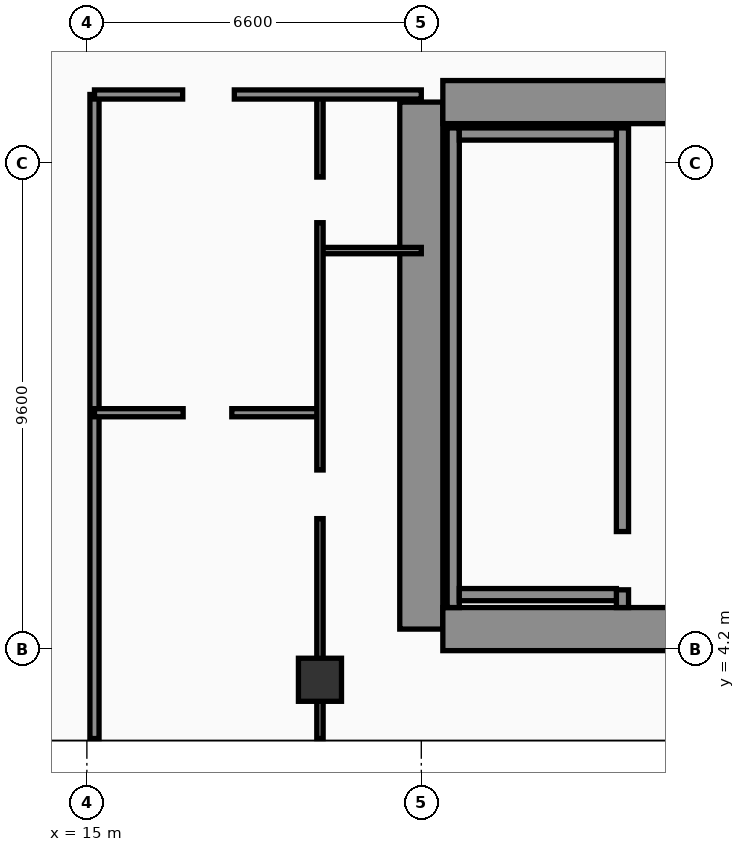
"""IFC4 building model, lengths in metres.
Left out: names, types, materials, properties, quantities, classifications, styles, units other than length and angle.
Written with IfcOpenShell. Run it as: python <this file> out.ifc"""

import sys

from ifc_helpers import new_model, si_unit, direction, frame, frame_2d, origin, origin_2d, place, context, subcontext, project, spatial, rectangle, hollow_rectangle, extrude, element, fill, save


model = new_model("IFC4")
c1 = context("Model", 3, precision=1e-05, world=origin(), true_north=direction((0.0, 1.0)))
c2 = subcontext(c1, "Body", "Model", "MODEL_VIEW")
j1 = project(units=[si_unit("LENGTHUNIT", "METRE"), si_unit("PLANEANGLEUNIT", "RADIAN")], contexts=[c1])
p1 = place(None, origin())
s1 = spatial("IfcSite", under=j1, at=p1, CompositionType="ELEMENT")
p2 = place(p1, origin())
s2 = spatial("IfcBuilding", under=s1, at=p2, CompositionType="ELEMENT")
p3 = place(p2, frame((0.0, 0.0, 171.3)))
s3 = spatial("IfcBuildingStorey", under=s2, at=p3, CompositionType="ELEMENT", Elevation=171.3)
p4 = place(p3, frame((21.6, 4.6, 0.0), z_axis=(0.0, 0.0, 1.0), x_axis=(0.0, 1.0, 0.0)))
e1 = element("IfcWall", 1, at=p4, inside=s3, PredefinedType="SHEAR", context=c2, shape_type="SweptSolid", body=[
    extrude(rectangle(XDim=10.4, YDim=0.85, at=frame_2d((5.2, 0.0))), origin(), (0.0, 0.0, 1.0), 3.56),
])
p5 = place(p3, frame((22.025, 15.0, 0.0), z_axis=(0.0, 0.0, 1.0), x_axis=(1.0, 0.0, 0.0)))
e2 = element("IfcWall", 2, at=p5, inside=s3, PredefinedType="SHEAR", context=c2, shape_type="SweptSolid", body=[
    extrude(rectangle(XDim=9.95, YDim=0.85, at=frame_2d((4.975, 0.0))), origin(), (0.0, 0.0, 1.0), 3.56),
])
p6 = place(p5, frame((4.88, 0.0, 0.0)))
e3 = element("IfcOpeningElement", 3, at=p6, cuts=e2, PredefinedType="OPENING", context=c2, shape_type="SweptSolid", body=[
    extrude(rectangle(XDim=1.1, YDim=2.2, at=frame_2d((0.55, 1.1))), frame((0.0, 0.435, 0.0), z_axis=(0.0, -1.0, 0.0), x_axis=(1.0, 0.0, 0.0)), (0.0, 0.0, 1.0), 0.87),
])
p7 = place(p3, frame((22.025, 4.6, 0.0), z_axis=(0.0, 0.0, 1.0), x_axis=(1.0, 0.0, 0.0)))
e4 = element("IfcWall", 4, at=p7, inside=s3, PredefinedType="SHEAR", context=c2, shape_type="SweptSolid", body=[
    extrude(rectangle(XDim=9.95, YDim=0.85, at=frame_2d((4.975, 0.0))), origin(), (0.0, 0.0, 1.0), 3.56),
])
p8 = place(p3, frame((22.23, 5.025, 0.0), z_axis=(0.0, 0.0, 1.0), x_axis=(0.0, 1.0, 0.0)))
e5 = element("IfcWall", 5, at=p8, inside=s3, PredefinedType="SOLIDWALL", context=c2, shape_type="SweptSolid", body=[
    extrude(rectangle(XDim=9.465, YDim=0.24, at=frame_2d((4.732, 0.0))), origin(), (0.0, 0.0, 1.0), 3.56),
])
p9 = place(p3, frame((25.57, 5.025, 0.0), z_axis=(0.0, 0.0, 1.0), x_axis=(0.0, 1.0, 0.0)))
e6 = element("IfcWall", 6, at=p9, inside=s3, PredefinedType="SOLIDWALL", context=c2, shape_type="SweptSolid", body=[
    extrude(rectangle(XDim=9.465, YDim=0.24, at=frame_2d((4.732, 0.0))), origin(), (0.0, 0.0, 1.0), 3.56),
])
p10 = place(p9, frame((0.35, 0.0, 0.0)))
e7 = element("IfcOpeningElement", 7, at=p10, cuts=e6, PredefinedType="OPENING", context=c2, shape_type="SweptSolid", body=[
    extrude(rectangle(XDim=1.15, YDim=2.2, at=frame_2d((0.575, 1.1))), frame((0.0, 0.13, 0.0), z_axis=(0.0, -1.0, 0.0), x_axis=(1.0, 0.0, 0.0)), (0.0, 0.0, 1.0), 0.26),
])
for number, where, z_axis, x_axis in (
    (8, (22.35, 5.28, 0.0), (0.0, 0.0, 1.0), (1.0, 0.0, 0.0)),
    (9, (22.35, 14.37, 0.0), (0.0, 0.0, 1.0), (1.0, 0.0, 0.0)),
):
    element("IfcWall", number, at=place(p3, frame(where, z_axis=z_axis, x_axis=x_axis)), inside=s3, PredefinedType="SOLIDWALL", context=c2, shape_type="SweptSolid", body=[
        extrude(rectangle(XDim=3.1, YDim=0.24, at=frame_2d((1.55, 0.0))), origin(), (0.0, 0.0, 1.0), 3.56),
    ])
p11 = place(p3, frame((19.6, 3.6, 0.0), z_axis=(0.0, 0.0, 1.0), x_axis=(1.0, 0.0, 0.0)))
e10 = element("IfcColumn", 10, at=p11, inside=s3, PredefinedType="COLUMN", context=c2, shape_type="SweptSolid", body=[
    extrude(hollow_rectangle(XDim=0.85, YDim=0.85, WallThickness=0.036, at=origin_2d()), origin(), (0.0, 0.0, 1.0), 3.56),
])
p12 = place(p3, frame((15.15, 2.44, 0.0), z_axis=(0.0, 0.0, 1.0), x_axis=(0.0, 1.0, 0.0)))
e11 = element("IfcWall", 11, at=p12, inside=s3, PredefinedType="PARTITIONING", context=c2, shape_type="SweptSolid", body=[
    extrude(rectangle(XDim=12.71, YDim=0.18, at=frame_2d((6.355, 0.0))), origin(), (0.0, 0.0, 1.0), 3.04),
])
p13 = place(p3, frame((19.6, 12.07, 0.0), z_axis=(0.0, 0.0, 1.0), x_axis=(1.0, 0.0, 0.0)))
e12 = element("IfcWall", 12, at=p13, inside=s3, PredefinedType="PARTITIONING", context=c2, shape_type="SweptSolid", body=[
    extrude(rectangle(XDim=2.0, YDim=0.125, at=frame_2d((1.0, 0.0))), origin(), (0.0, 0.0, 1.0), 3.56),
])
p14 = place(p3, frame((15.15, 8.87, 0.0), z_axis=(0.0, 0.0, 1.0), x_axis=(1.0, 0.0, 0.0)))
e13 = element("IfcWall", 13, at=p14, inside=s3, PredefinedType="PARTITIONING", context=c2, shape_type="SweptSolid", body=[
    extrude(rectangle(XDim=4.45, YDim=0.16, at=frame_2d((2.225, 0.0))), origin(), (0.0, 0.0, 1.0), 3.56),
])
p15 = place(p14, frame((1.75, 0.0, 0.0)))
e14 = element("IfcOpeningElement", 14, at=p15, cuts=e13, PredefinedType="OPENING", context=c2, shape_type="SweptSolid", body=[
    extrude(rectangle(XDim=0.96, YDim=2.2, at=frame_2d((0.48, 1.1))), frame((0.0, 0.09, 0.0), z_axis=(0.0, -1.0, 0.0), x_axis=(1.0, 0.0, 0.0)), (0.0, 0.0, 1.0), 0.18),
])
p16 = place(p3, frame((19.6, 2.44, 0.0), z_axis=(0.0, 0.0, 1.0), x_axis=(0.0, 1.0, 0.0)))
e15 = element("IfcWall", 15, at=p16, inside=s3, PredefinedType="PARTITIONING", context=c2, shape_type="SweptSolid", body=[
    extrude(rectangle(XDim=12.71, YDim=0.125, at=frame_2d((6.355, 0.0))), origin(), (0.0, 0.0, 1.0), 2.49),
])
p17 = place(p16, frame((4.34, 0.0, 0.0)))
e16 = element("IfcOpeningElement", 16, at=p17, cuts=e15, PredefinedType="OPENING", context=c2, shape_type="SweptSolid", body=[
    extrude(rectangle(XDim=0.96, YDim=2.2, at=frame_2d((0.48, 1.1))), frame((0.0, 0.073, 0.0), z_axis=(0.0, -1.0, 0.0), x_axis=(1.0, 0.0, 0.0)), (0.0, 0.0, 1.0), 0.145),
])
p18 = place(p16, frame((10.18, 0.0, 0.0)))
e17 = element("IfcOpeningElement", 17, at=p18, cuts=e15, PredefinedType="OPENING", context=c2, shape_type="SweptSolid", body=[
    extrude(rectangle(XDim=0.9, YDim=2.15, at=frame_2d((0.45, 1.075))), frame((0.0, 0.073, 0.0), z_axis=(0.0, -1.0, 0.0), x_axis=(1.0, 0.0, 0.0)), (0.0, 0.0, 1.0), 0.145),
])
p19 = place(p3, frame((15.15, 15.15, 0.0), z_axis=(0.0, 0.0, 1.0), x_axis=(1.0, 0.0, 0.0)))
e18 = element("IfcWall", 18, at=p19, inside=s3, PredefinedType="PARTITIONING", context=c2, shape_type="SweptSolid", body=[
    extrude(rectangle(XDim=6.45, YDim=0.18, at=frame_2d((3.225, 0.0))), origin(), (0.0, 0.0, 1.0), 2.49),
])
p20 = place(p19, frame((1.74, 0.0, 0.0)))
e19 = element("IfcOpeningElement", 19, at=p20, cuts=e18, PredefinedType="OPENING", context=c2, shape_type="SweptSolid", body=[
    extrude(rectangle(XDim=1.02, YDim=2.2, at=frame_2d((0.51, 1.1))), frame((0.0, 0.1, 0.0), z_axis=(0.0, -1.0, 0.0), x_axis=(1.0, 0.0, 0.0)), (0.0, 0.0, 1.0), 0.2),
])
p21 = place(p15, origin())
e20 = element("IfcDoor", 20, at=p21, inside=s3, OperationType="SINGLE_SWING_LEFT", PredefinedType="DOOR", context=c2, shape_type="SweptSolid", body=[
    extrude(rectangle(XDim=0.96, YDim=2.2, at=frame_2d((0.48, 1.1))), frame((0.0, 0.025, 0.0), z_axis=(0.0, -1.0, 0.0), x_axis=(1.0, 0.0, 0.0)), (0.0, 0.0, 1.0), 0.05),
])
fill(e14, e20)
p22 = place(p17, origin())
e21 = element("IfcDoor", 21, at=p22, inside=s3, OperationType="SINGLE_SWING_LEFT", PredefinedType="DOOR", context=c2, shape_type="SweptSolid", body=[
    extrude(rectangle(XDim=0.96, YDim=2.2, at=frame_2d((0.48, 1.1))), frame((0.0, 0.025, 0.0), z_axis=(0.0, -1.0, 0.0), x_axis=(1.0, 0.0, 0.0)), (0.0, 0.0, 1.0), 0.05),
])
fill(e16, e21)
p23 = place(p18, origin())
e22 = element("IfcDoor", 22, at=p23, inside=s3, OperationType="SINGLE_SWING_RIGHT", PredefinedType="DOOR", context=c2, shape_type="SweptSolid", body=[
    extrude(rectangle(XDim=0.9, YDim=2.15, at=frame_2d((0.45, 1.075))), frame((0.0, 0.025, 0.0), z_axis=(0.0, -1.0, 0.0), x_axis=(1.0, 0.0, 0.0)), (0.0, 0.0, 1.0), 0.05),
])
fill(e17, e22)
p24 = place(p20, origin())
e23 = element("IfcDoor", 23, at=p24, inside=s3, OperationType="SINGLE_SWING_LEFT", PredefinedType="DOOR", context=c2, shape_type="SweptSolid", body=[
    extrude(rectangle(XDim=1.02, YDim=2.2, at=frame_2d((0.51, 1.1))), frame((0.0, 0.025, 0.0), z_axis=(0.0, -1.0, 0.0), x_axis=(1.0, 0.0, 0.0)), (0.0, 0.0, 1.0), 0.05),
])
fill(e19, e23)
p25 = place(p10, origin())
e24 = element("IfcDoor", 24, at=p25, inside=s3, OperationType="SINGLE_SWING_RIGHT", PredefinedType="DOOR", context=c2, shape_type="SweptSolid", body=[
    extrude(rectangle(XDim=1.15, YDim=2.2, at=frame_2d((0.575, 1.1))), frame((0.0, 0.025, 0.0), z_axis=(0.0, -1.0, 0.0), x_axis=(1.0, 0.0, 0.0)), (0.0, 0.0, 1.0), 0.05),
])
fill(e7, e24)
save(model, sys.argv[1])
